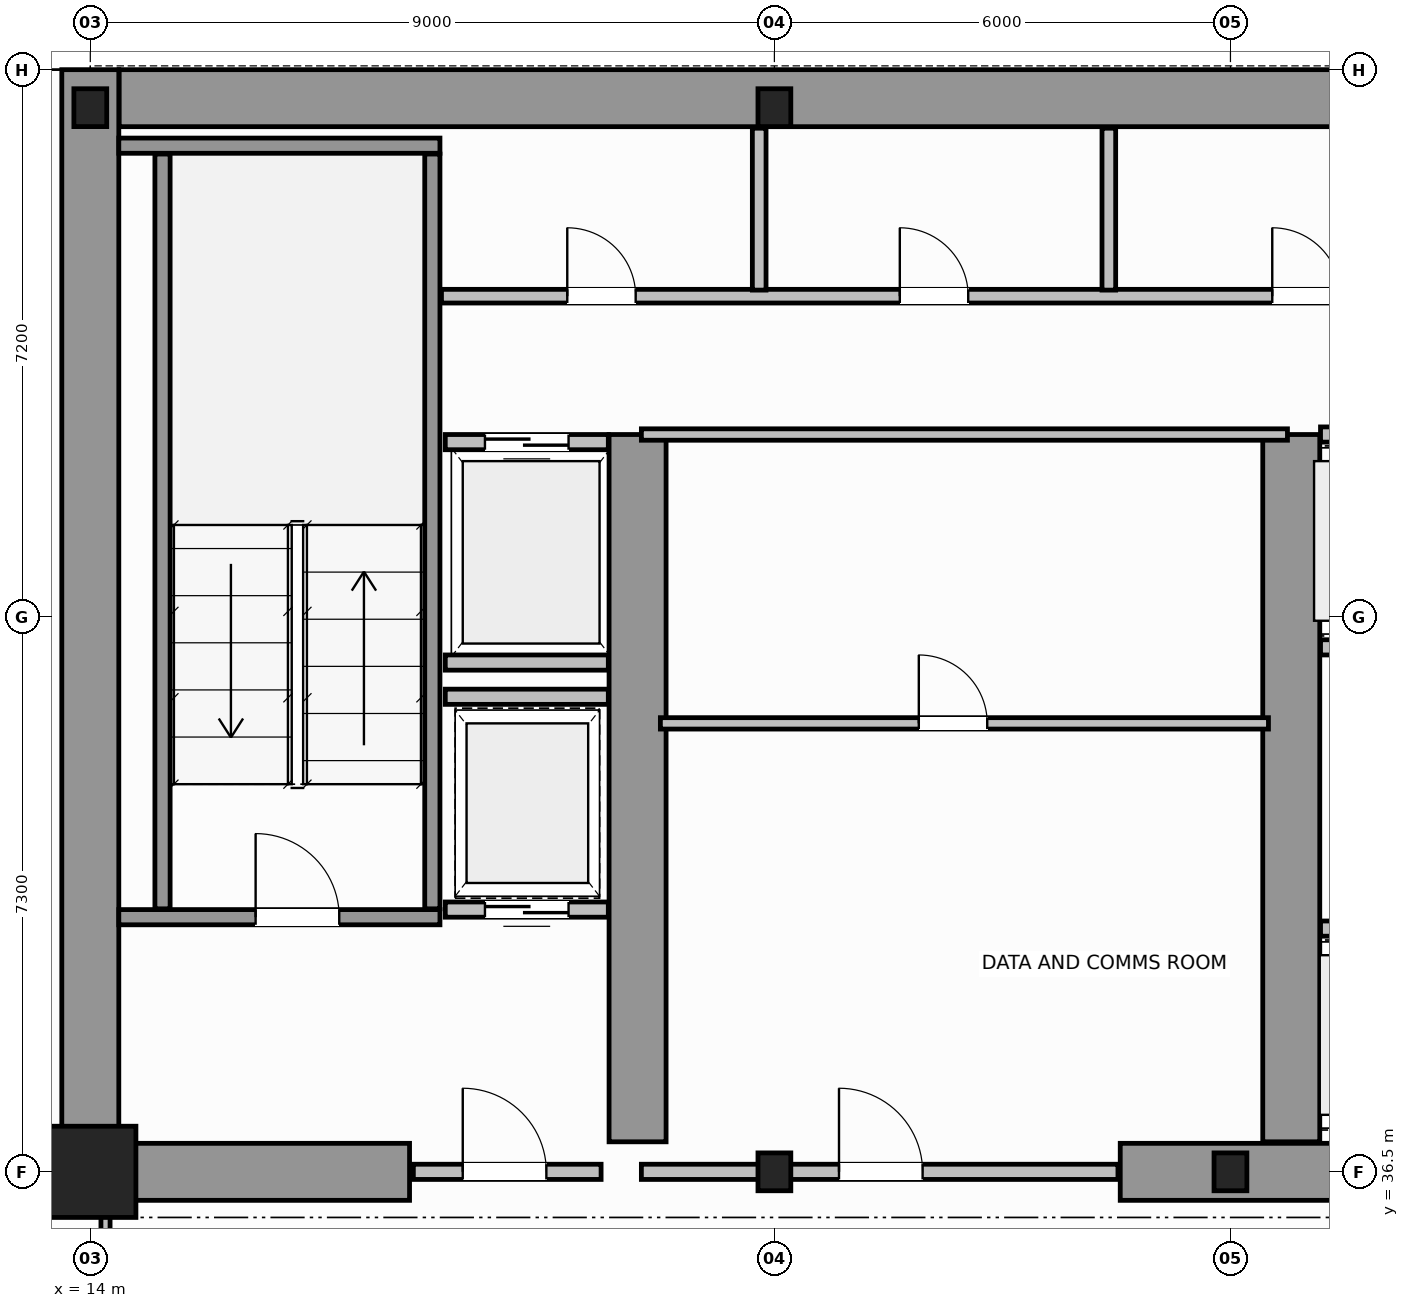
"""IFC4 building model, lengths in metres.
Left out: names, types, materials, properties, quantities, classifications, styles, units other than length and angle.
Written with IfcOpenShell. Run it as: python <this file> out.ifc"""

import sys

from ifc_helpers import new_model, si_unit, direction, frame, frame_2d, origin, origin_2d, place, context, subcontext, project, spatial, rectangle, i_section, extrude, source, transform, mapped, element, fill, save


model = new_model("IFC4")
c1 = context("Model", 3, precision=1e-05, world=origin(), true_north=direction((0.0, 1.0)))
c2 = subcontext(c1, "Body", "Model", "MODEL_VIEW")
j1 = project(units=[si_unit("LENGTHUNIT", "METRE"), si_unit("PLANEANGLEUNIT", "RADIAN")], contexts=[c1])
p1 = place(None, origin())
s1 = spatial("IfcSite", under=j1, at=p1, CompositionType="ELEMENT")
p2 = place(p1, origin())
s2 = spatial("IfcBuilding", under=s1, at=p2, CompositionType="ELEMENT")
p3 = place(p2, frame((0.0, 0.0, 157.6)))
s3 = spatial("IfcBuildingStorey", under=s2, at=p3, CompositionType="ELEMENT", Elevation=157.6)
m1 = source(origin(), c2, "Body", "SweptSolid", [
    extrude(rectangle(XDim=1.2, YDim=1.2, at=origin_2d()), origin(), (0.0, 0.0, 1.0), 3.8),
])
p4 = place(p3, frame((14.0, 36.5, 0.0), z_axis=(0.0, 0.0, 1.0), x_axis=(1.0, 0.0, 0.0)))
e1 = element("IfcColumn", 1, at=p4, inside=s3, PredefinedType="COLUMN", context=c2, shape_type="MappedRepresentation", body=[
    mapped(m1, transform((0.0, 0.0, 0.0), scale=1.0)),
])
m2 = source(origin(), c2, "Body", "SweptSolid", [
    extrude(i_section(OverallWidth=0.432, OverallDepth=0.498, WebThickness=0.055, FlangeThickness=0.068, FilletRadius=0.015, at=origin_2d()), origin(), (0.0, 0.0, 1.0), 3.8),
])
for number, where, z_axis, x_axis in (
    (2, (23.0, 36.5, 0.0), (0.0, 0.0, 1.0), (1.0, 0.0, 0.0)),
    (3, (29.0, 36.5, 0.0), (0.0, 0.0, 1.0), (1.0, 0.0, 0.0)),
    (4, (14.0, 50.5, 0.0), (0.0, 0.0, 1.0), (1.0, 0.0, 0.0)),
    (5, (23.0, 50.5, 0.0), (0.0, 0.0, 1.0), (1.0, 0.0, 0.0)),
):
    element("IfcColumn", number, at=place(p3, frame(where, z_axis=z_axis, x_axis=x_axis)), inside=s3, PredefinedType="COLUMN", context=c2, shape_type="MappedRepresentation", body=[
        mapped(m2, transform((0.0, 0.0, 0.0), scale=1.0)),
    ])
p5 = place(p3, frame((14.379, 50.625, 0.0), z_axis=(0.0, 0.0, 1.0), x_axis=(1.0, 0.0, 0.0)))
e6 = element("IfcWall", 6, at=p5, inside=s3, PredefinedType="SHEAR", context=c2, shape_type="SweptSolid", body=[
    extrude(rectangle(XDim=19.619, YDim=0.75, at=frame_2d((9.81, 0.0))), origin(), (0.0, 0.0, 1.0), 3.8),
])
p6 = place(p3, frame((14.0, 36.5, 0.0), z_axis=(0.0, 0.0, 1.0), x_axis=(0.0, 1.0, 0.0)))
e7 = element("IfcWall", 7, at=p6, inside=s3, PredefinedType="SHEAR", context=c2, shape_type="SweptSolid", body=[
    extrude(rectangle(XDim=14.5, YDim=0.75, at=frame_2d((7.25, 0.0))), origin(), (0.0, 0.0, 1.0), 3.8),
])
p7 = place(p3, frame((14.395, 36.5, 0.0), z_axis=(0.0, 0.0, 1.0), x_axis=(1.0, 0.0, 0.0)))
e8 = element("IfcWall", 8, at=p7, inside=s3, PredefinedType="SHEAR", context=c2, shape_type="SweptSolid", body=[
    extrude(rectangle(XDim=3.805, YDim=0.75, at=frame_2d((1.902, 0.0))), origin(), (0.0, 0.0, 1.0), 2.38),
])
p8 = place(p3, frame((27.55, 36.5, 0.0), z_axis=(0.0, 0.0, 1.0), x_axis=(1.0, 0.0, 0.0)))
e9 = element("IfcWall", 9, at=p8, inside=s3, PredefinedType="SHEAR", context=c2, shape_type="SweptSolid", body=[
    extrude(rectangle(XDim=4.5, YDim=0.75, at=frame_2d((2.25, 0.0))), origin(), (0.0, 0.0, 1.0), 3.8),
])
for number, where, z_axis, x_axis in (
    (10, (21.2, 36.895, 0.0), (0.0, 0.0, 1.0), (0.0, 1.0, 0.0)),
    (11, (29.8, 36.895, 0.0), (0.0, 0.0, 1.0), (0.0, 1.0, 0.0)),
):
    element("IfcWall", number, at=place(p3, frame(where, z_axis=z_axis, x_axis=x_axis)), inside=s3, PredefinedType="SHEAR", context=c2, shape_type="SweptSolid", body=[
        extrude(rectangle(XDim=9.305, YDim=0.75, at=frame_2d((4.652, 0.0))), origin(), (0.0, 0.0, 1.0), 3.8),
    ])
p9 = place(p3, frame((14.375, 39.85, 0.0), z_axis=(0.0, 0.0, 1.0), x_axis=(1.0, 0.0, 0.0)))
e12 = element("IfcWall", 12, at=p9, inside=s3, PredefinedType="SOLIDWALL", context=c2, shape_type="SweptSolid", body=[
    extrude(rectangle(XDim=4.225, YDim=0.2, at=frame_2d((2.113, 0.0))), origin(), (0.0, 0.0, 1.0), 3.8),
])
p10 = place(p9, frame((1.8, 0.0, 0.0)))
e13 = element("IfcOpeningElement", 13, at=p10, cuts=e12, PredefinedType="OPENING", context=c2, shape_type="SweptSolid", body=[
    extrude(rectangle(XDim=1.1, YDim=2.15, at=frame_2d((0.55, 1.075))), frame((0.0, 0.11, 0.0), z_axis=(0.0, -1.0, 0.0), x_axis=(1.0, 0.0, 0.0)), (0.0, 0.0, 1.0), 0.22),
])
p11 = place(p3, frame((14.375, 50.0, 0.0), z_axis=(0.0, 0.0, 1.0), x_axis=(1.0, 0.0, 0.0)))
e14 = element("IfcWall", 14, at=p11, inside=s3, PredefinedType="SOLIDWALL", context=c2, shape_type="SweptSolid", body=[
    extrude(rectangle(XDim=4.225, YDim=0.2, at=frame_2d((2.113, 0.0))), origin(), (0.0, 0.0, 1.0), 3.8),
])
for number, where, z_axis, x_axis in (
    (15, (14.95, 39.96, 0.0), (0.0, 0.0, 1.0), (0.0, 1.0, 0.0)),
    (16, (18.5, 39.96, 0.0), (0.0, 0.0, 1.0), (0.0, 1.0, 0.0)),
):
    element("IfcWall", number, at=place(p3, frame(where, z_axis=z_axis, x_axis=x_axis)), inside=s3, PredefinedType="SOLIDWALL", context=c2, shape_type="SweptSolid", body=[
        extrude(rectangle(XDim=9.93, YDim=0.2, at=frame_2d((4.965, 0.0))), origin(), (0.0, 0.0, 1.0), 3.8),
    ])
p12 = place(p3, frame((18.25, 36.5, 0.0), z_axis=(0.0, 0.0, 1.0), x_axis=(1.0, 0.0, 0.0)))
e17 = element("IfcWall", 17, at=p12, inside=s3, PredefinedType="SOLIDWALL", context=c2, shape_type="SweptSolid", body=[
    extrude(rectangle(XDim=2.47, YDim=0.2, at=frame_2d((1.235, 0.0))), origin(), (0.0, 0.0, 1.0), 2.37),
])
p13 = place(p12, frame((0.65, 0.0, 0.0)))
e18 = element("IfcOpeningElement", 18, at=p13, cuts=e17, PredefinedType="OPENING", context=c2, shape_type="SweptSolid", body=[
    extrude(rectangle(XDim=1.1, YDim=2.15, at=frame_2d((0.55, 1.075))), frame((0.0, 0.11, 0.0), z_axis=(0.0, -1.0, 0.0), x_axis=(1.0, 0.0, 0.0)), (0.0, 0.0, 1.0), 0.22),
])
p14 = place(p3, frame((30.185, 39.7, 0.0), z_axis=(0.0, 0.0, 1.0), x_axis=(1.0, 0.0, 0.0)))
e19 = element("IfcWall", 19, at=p14, inside=s3, PredefinedType="SOLIDWALL", context=c2, shape_type="SweptSolid", body=[
    extrude(rectangle(XDim=1.845, YDim=0.2, at=frame_2d((0.922, 0.0))), origin(), (0.0, 0.0, 1.0), 3.58),
])
p15 = place(p14, frame((0.373, 0.0, 0.0)))
e20 = element("IfcOpeningElement", 20, at=p15, cuts=e19, PredefinedType="OPENING", context=c2, shape_type="SweptSolid", body=[
    extrude(rectangle(XDim=1.1, YDim=2.15, at=frame_2d((0.55, 1.075))), frame((0.0, 0.11, 0.0), z_axis=(0.0, -1.0, 0.0), x_axis=(1.0, 0.0, 0.0)), (0.0, 0.0, 1.0), 0.22),
])
p16 = place(p3, frame((30.185, 43.4, 0.0), z_axis=(0.0, 0.0, 1.0), x_axis=(1.0, 0.0, 0.0)))
e21 = element("IfcWall", 21, at=p16, inside=s3, PredefinedType="SOLIDWALL", context=c2, shape_type="SweptSolid", body=[
    extrude(rectangle(XDim=1.725, YDim=0.2, at=frame_2d((0.862, 0.0))), origin(), (0.0, 0.0, 1.0), 3.58),
])
p17 = place(p16, frame((0.313, 0.0, 0.0)))
e22 = element("IfcOpeningElement", 22, at=p17, cuts=e21, PredefinedType="OPENING", context=c2, shape_type="SweptSolid", body=[
    extrude(rectangle(XDim=1.1, YDim=2.15, at=frame_2d((0.55, 1.075))), frame((0.0, 0.11, 0.0), z_axis=(0.0, -1.0, 0.0), x_axis=(1.0, 0.0, 0.0)), (0.0, 0.0, 1.0), 0.22),
])
p18 = place(p3, frame((30.185, 46.2, 0.0), z_axis=(0.0, 0.0, 1.0), x_axis=(1.0, 0.0, 0.0)))
e23 = element("IfcWall", 23, at=p18, inside=s3, PredefinedType="SOLIDWALL", context=c2, shape_type="SweptSolid", body=[
    extrude(rectangle(XDim=1.725, YDim=0.2, at=frame_2d((0.862, 0.0))), origin(), (0.0, 0.0, 1.0), 3.58),
])
p19 = place(p3, frame((18.67, 46.1, 0.0), z_axis=(0.0, 0.0, 1.0), x_axis=(1.0, 0.0, 0.0)))
e24 = element("IfcWall", 24, at=p19, inside=s3, PredefinedType="SOLIDWALL", context=c2, shape_type="SweptSolid", body=[
    extrude(rectangle(XDim=2.145, YDim=0.2, at=frame_2d((1.073, 0.0))), origin(), (0.0, 0.0, 1.0), 3.58),
])
p20 = place(p19, frame((0.522, 0.0, 0.0)))
e25 = element("IfcOpeningElement", 25, at=p20, cuts=e24, PredefinedType="OPENING", context=c2, shape_type="SweptSolid", body=[
    extrude(rectangle(XDim=1.1, YDim=2.15, at=frame_2d((0.55, 1.075))), frame((0.0, 0.11, 0.0), z_axis=(0.0, -1.0, 0.0), x_axis=(1.0, 0.0, 0.0)), (0.0, 0.0, 1.0), 0.22),
])
p21 = place(p3, frame((18.67, 43.2, 0.0), z_axis=(0.0, 0.0, 1.0), x_axis=(1.0, 0.0, 0.0)))
e26 = element("IfcWall", 26, at=p21, inside=s3, PredefinedType="SOLIDWALL", context=c2, shape_type="SweptSolid", body=[
    extrude(rectangle(XDim=2.145, YDim=0.2, at=frame_2d((1.073, 0.0))), origin(), (0.0, 0.0, 1.0), 3.58),
])
p22 = place(p3, frame((18.67, 39.95, 0.0), z_axis=(0.0, 0.0, 1.0), x_axis=(1.0, 0.0, 0.0)))
e27 = element("IfcWall", 27, at=p22, inside=s3, PredefinedType="SOLIDWALL", context=c2, shape_type="SweptSolid", body=[
    extrude(rectangle(XDim=2.145, YDim=0.2, at=frame_2d((1.073, 0.0))), origin(), (0.0, 0.0, 1.0), 3.58),
])
p23 = place(p22, frame((0.522, 0.0, 0.0)))
e28 = element("IfcOpeningElement", 28, at=p23, cuts=e27, PredefinedType="OPENING", context=c2, shape_type="SweptSolid", body=[
    extrude(rectangle(XDim=1.1, YDim=2.15, at=frame_2d((0.55, 1.075))), frame((0.0, 0.11, 0.0), z_axis=(0.0, -1.0, 0.0), x_axis=(1.0, 0.0, 0.0)), (0.0, 0.0, 1.0), 0.22),
])
p24 = place(p3, frame((18.67, 42.75, 0.0), z_axis=(0.0, 0.0, 1.0), x_axis=(1.0, 0.0, 0.0)))
e29 = element("IfcWall", 29, at=p24, inside=s3, PredefinedType="SOLIDWALL", context=c2, shape_type="SweptSolid", body=[
    extrude(rectangle(XDim=2.145, YDim=0.2, at=frame_2d((1.073, 0.0))), origin(), (0.0, 0.0, 1.0), 3.58),
])
p25 = place(p3, frame((21.25, 36.5, 0.0), z_axis=(0.0, 0.0, 1.0), x_axis=(1.0, 0.0, 0.0)))
e30 = element("IfcWall", 30, at=p25, inside=s3, PredefinedType="SOLIDWALL", context=c2, shape_type="SweptSolid", body=[
    extrude(rectangle(XDim=6.27, YDim=0.2, at=frame_2d((3.135, 0.0))), origin(), (0.0, 0.0, 1.0), 2.37),
])
p26 = place(p25, frame((2.6, 0.0, 0.0)))
e31 = element("IfcOpeningElement", 31, at=p26, cuts=e30, PredefinedType="OPENING", context=c2, shape_type="SweptSolid", body=[
    extrude(rectangle(XDim=1.1, YDim=2.15, at=frame_2d((0.55, 1.075))), frame((0.0, 0.11, 0.0), z_axis=(0.0, -1.0, 0.0), x_axis=(1.0, 0.0, 0.0)), (0.0, 0.0, 1.0), 0.22),
])
p27 = place(p3, frame((21.25, 46.2, 0.0), z_axis=(0.0, 0.0, 1.0), x_axis=(1.0, 0.0, 0.0)))
e32 = element("IfcWall", 32, at=p27, inside=s3, PredefinedType="PARTITIONING", context=c2, shape_type="SweptSolid", body=[
    extrude(rectangle(XDim=8.5, YDim=0.15, at=frame_2d((4.25, 0.0))), origin(), (0.0, 0.0, 1.0), 3.58),
])
p28 = place(p3, frame((21.5, 42.4, 0.0), z_axis=(0.0, 0.0, 1.0), x_axis=(1.0, 0.0, 0.0)))
e33 = element("IfcWall", 33, at=p28, inside=s3, PredefinedType="PARTITIONING", context=c2, shape_type="SweptSolid", body=[
    extrude(rectangle(XDim=8.0, YDim=0.15, at=frame_2d((4.0, 0.0))), origin(), (0.0, 0.0, 1.0), 3.58),
])
p29 = place(p28, frame((3.4, 0.0, 0.0)))
e34 = element("IfcOpeningElement", 34, at=p29, cuts=e33, PredefinedType="OPENING", context=c2, shape_type="SweptSolid", body=[
    extrude(rectangle(XDim=0.9, YDim=2.1, at=frame_2d((0.45, 1.05))), frame((0.0, 0.085, 0.0), z_axis=(0.0, -1.0, 0.0), x_axis=(1.0, 0.0, 0.0)), (0.0, 0.0, 1.0), 0.17),
])
p30 = place(p3, frame((18.62, 48.02, 0.0), z_axis=(0.0, 0.0, 1.0), x_axis=(1.0, 0.0, 0.0)))
e35 = element("IfcWall", 35, at=p30, inside=s3, PredefinedType="PLUMBINGWALL", context=c2, shape_type="SweptSolid", body=[
    extrude(rectangle(XDim=30.76, YDim=0.18, at=frame_2d((15.38, 0.0))), origin(), (0.0, 0.0, 1.0), 3.58),
])
p31 = place(p30, frame((1.655, 0.0, 0.0)))
e36 = element("IfcOpeningElement", 36, at=p31, cuts=e35, PredefinedType="OPENING", context=c2, shape_type="SweptSolid", body=[
    extrude(rectangle(XDim=0.9, YDim=2.15, at=frame_2d((0.45, 1.075))), frame((0.0, 0.1, 0.0), z_axis=(0.0, -1.0, 0.0), x_axis=(1.0, 0.0, 0.0)), (0.0, 0.0, 1.0), 0.2),
])
p32 = place(p30, frame((6.03, 0.0, 0.0)))
e37 = element("IfcOpeningElement", 37, at=p32, cuts=e35, PredefinedType="OPENING", context=c2, shape_type="SweptSolid", body=[
    extrude(rectangle(XDim=0.9, YDim=2.15, at=frame_2d((0.45, 1.075))), frame((0.0, 0.1, 0.0), z_axis=(0.0, -1.0, 0.0), x_axis=(1.0, 0.0, 0.0)), (0.0, 0.0, 1.0), 0.2),
])
p33 = place(p30, frame((10.93, 0.0, 0.0)))
e38 = element("IfcOpeningElement", 38, at=p33, cuts=e35, PredefinedType="OPENING", context=c2, shape_type="SweptSolid", body=[
    extrude(rectangle(XDim=0.9, YDim=2.15, at=frame_2d((0.45, 1.075))), frame((0.0, 0.1, 0.0), z_axis=(0.0, -1.0, 0.0), x_axis=(1.0, 0.0, 0.0)), (0.0, 0.0, 1.0), 0.2),
])
p34 = place(p30, frame((16.13, 0.0, 0.0)))
e39 = element("IfcOpeningElement", 39, at=p34, cuts=e35, PredefinedType="OPENING", context=c2, shape_type="SweptSolid", body=[
    extrude(rectangle(XDim=0.9, YDim=2.15, at=frame_2d((0.45, 1.075))), frame((0.0, 0.1, 0.0), z_axis=(0.0, -1.0, 0.0), x_axis=(1.0, 0.0, 0.0)), (0.0, 0.0, 1.0), 0.2),
])
p35 = place(p30, frame((21.73, 0.0, 0.0)))
e40 = element("IfcOpeningElement", 40, at=p35, cuts=e35, PredefinedType="OPENING", context=c2, shape_type="SweptSolid", body=[
    extrude(rectangle(XDim=0.9, YDim=2.15, at=frame_2d((0.45, 1.075))), frame((0.0, 0.1, 0.0), z_axis=(0.0, -1.0, 0.0), x_axis=(1.0, 0.0, 0.0)), (0.0, 0.0, 1.0), 0.2),
])
p36 = place(p30, frame((27.505, 0.0, 0.0)))
e41 = element("IfcOpeningElement", 41, at=p36, cuts=e35, PredefinedType="OPENING", context=c2, shape_type="SweptSolid", body=[
    extrude(rectangle(XDim=0.9, YDim=2.15, at=frame_2d((0.45, 1.075))), frame((0.0, 0.1, 0.0), z_axis=(0.0, -1.0, 0.0), x_axis=(1.0, 0.0, 0.0)), (0.0, 0.0, 1.0), 0.2),
])
p37 = place(p3, frame((22.8, 48.1, 0.0), z_axis=(0.0, 0.0, 1.0), x_axis=(0.0, 1.0, 0.0)))
e42 = element("IfcWall", 42, at=p37, inside=s3, PredefinedType="PLUMBINGWALL", context=c2, shape_type="SweptSolid", body=[
    extrude(rectangle(XDim=2.13, YDim=0.18, at=frame_2d((1.065, 0.0))), origin(), (0.0, 0.0, 1.0), 2.97),
])
p38 = place(p3, frame((27.4, 48.1, 0.0), z_axis=(0.0, 0.0, 1.0), x_axis=(0.0, 1.0, 0.0)))
e43 = element("IfcWall", 43, at=p38, inside=s3, PredefinedType="PLUMBINGWALL", context=c2, shape_type="SweptSolid", body=[
    extrude(rectangle(XDim=2.13, YDim=0.18, at=frame_2d((1.065, 0.0))), origin(), (0.0, 0.0, 1.0), 3.58),
])
p39 = place(p3, frame((14.2, 34.0, 0.0), z_axis=(0.0, 0.0, 1.0), x_axis=(0.0, 1.0, 0.0)))
e44 = element("IfcWall", 44, at=p39, inside=s3, PredefinedType="PARTITIONING", context=c2, shape_type="SweptSolid", body=[
    extrude(rectangle(XDim=2.44, YDim=0.12, at=frame_2d((1.22, 0.0))), origin(), (0.0, 0.0, 1.0), 3.58),
])
p40 = place(p39, frame((0.7, 0.0, 0.0)))
e45 = element("IfcOpeningElement", 45, at=p40, cuts=e44, PredefinedType="OPENING", context=c2, shape_type="SweptSolid", body=[
    extrude(rectangle(XDim=0.9, YDim=2.15, at=frame_2d((0.45, 1.075))), frame((0.0, 0.07, 0.0), z_axis=(0.0, -1.0, 0.0), x_axis=(1.0, 0.0, 0.0)), (0.0, 0.0, 1.0), 0.14),
])
m3 = source(origin(), c2, "Body", "SweptSolid", [
    extrude(rectangle(XDim=1.1, YDim=2.15, at=frame_2d((0.55, 1.075))), frame((0.0, 0.025, 0.0), z_axis=(0.0, -1.0, 0.0), x_axis=(1.0, 0.0, 0.0)), (0.0, 0.0, 1.0), 0.05),
])
p41 = place(p10, origin())
e46 = element("IfcDoor", 46, at=p41, inside=s3, OperationType="SINGLE_SWING_LEFT", PredefinedType="DOOR", context=c2, shape_type="MappedRepresentation", body=[
    mapped(m3, transform((0.0, 0.0, 0.0), scale=1.0)),
])
fill(e13, e46)
p42 = place(p13, origin())
e47 = element("IfcDoor", 47, at=p42, inside=s3, OperationType="SINGLE_SWING_RIGHT", PredefinedType="DOOR", context=c2, shape_type="MappedRepresentation", body=[
    mapped(m3, transform((0.0, 0.0, 0.0), scale=1.0)),
])
fill(e18, e47)
p43 = place(p20, origin())
e48 = element("IfcDoor", 48, at=p43, inside=s3, OperationType="DOUBLE_DOOR_SLIDING", PredefinedType="DOOR", context=c2, shape_type="MappedRepresentation", body=[
    mapped(m3, transform((0.0, 0.0, 0.0), scale=1.0)),
])
fill(e25, e48)
p44 = place(p23, origin())
e49 = element("IfcDoor", 49, at=p44, inside=s3, OperationType="DOUBLE_DOOR_SLIDING", PredefinedType="DOOR", context=c2, shape_type="MappedRepresentation", body=[
    mapped(m3, transform((0.0, 0.0, 0.0), scale=1.0)),
])
fill(e28, e49)
p45 = place(p26, origin())
e50 = element("IfcDoor", 50, at=p45, inside=s3, OperationType="SINGLE_SWING_LEFT", PredefinedType="DOOR", context=c2, shape_type="MappedRepresentation", body=[
    mapped(m3, transform((0.0, 0.0, 0.0), scale=1.0)),
])
fill(e31, e50)
m4 = source(origin(), c2, "Body", "SweptSolid", [
    extrude(rectangle(XDim=0.9, YDim=2.1, at=frame_2d((0.45, 1.05))), frame((0.0, 0.025, 0.0), z_axis=(0.0, -1.0, 0.0), x_axis=(1.0, 0.0, 0.0)), (0.0, 0.0, 1.0), 0.05),
])
p46 = place(p29, origin())
e51 = element("IfcDoor", 51, at=p46, inside=s3, OperationType="SINGLE_SWING_RIGHT", PredefinedType="DOOR", context=c2, shape_type="MappedRepresentation", body=[
    mapped(m4, transform((0.0, 0.0, 0.0), scale=1.0)),
])
fill(e34, e51)
m5 = source(origin(), c2, "Body", "SweptSolid", [
    extrude(rectangle(XDim=0.9, YDim=2.15, at=frame_2d((0.45, 1.075))), frame((0.0, 0.025, 0.0), z_axis=(0.0, -1.0, 0.0), x_axis=(1.0, 0.0, 0.0)), (0.0, 0.0, 1.0), 0.05),
])
p47 = place(p31, origin())
e52 = element("IfcDoor", 52, at=p47, inside=s3, OperationType="SINGLE_SWING_LEFT", PredefinedType="DOOR", context=c2, shape_type="MappedRepresentation", body=[
    mapped(m5, transform((0.0, 0.0, 0.0), scale=1.0)),
])
fill(e36, e52)
p48 = place(p32, origin())
e53 = element("IfcDoor", 53, at=p48, inside=s3, OperationType="SINGLE_SWING_RIGHT", PredefinedType="DOOR", context=c2, shape_type="MappedRepresentation", body=[
    mapped(m5, transform((0.0, 0.0, 0.0), scale=1.0)),
])
fill(e37, e53)
p49 = place(p33, origin())
e54 = element("IfcDoor", 54, at=p49, inside=s3, OperationType="SINGLE_SWING_LEFT", PredefinedType="DOOR", context=c2, shape_type="MappedRepresentation", body=[
    mapped(m5, transform((0.0, 0.0, 0.0), scale=1.0)),
])
fill(e38, e54)
save(model, sys.argv[1])
